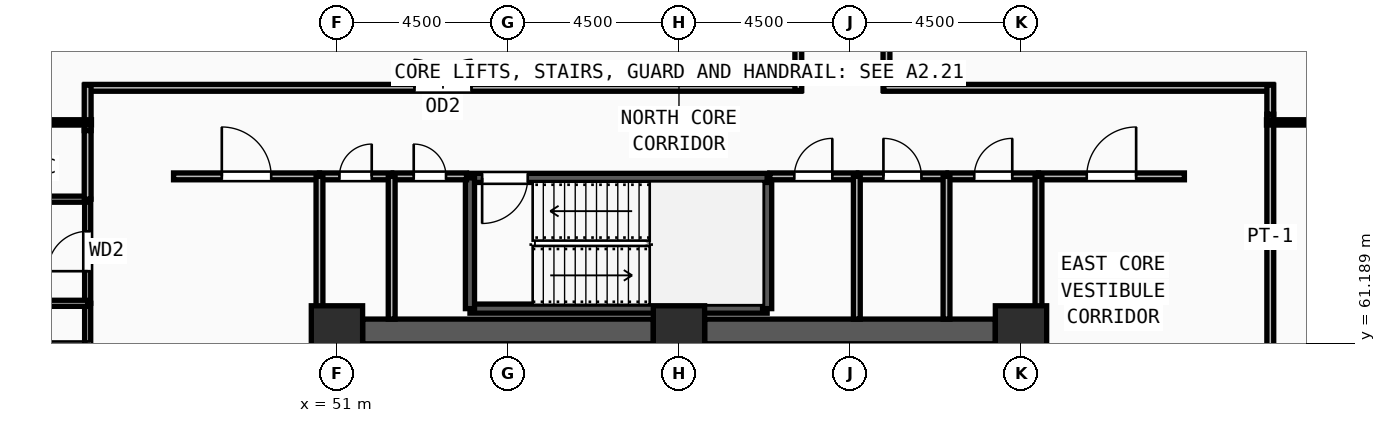
"""IFC4 building model, lengths in metres.
Left out: names, types, materials, properties, quantities, classifications, styles, units other than length and angle.
Written with IfcOpenShell. Run it as: python <this file> out.ifc"""

import sys

from ifc_helpers import new_model, si_unit, direction, frame, frame_2d, origin, origin_2d, place, context, subcontext, project, spatial, rectangle, extrude, source, transform, mapped, element, fill, save


model = new_model("IFC4")
c1 = context("Model", 3, precision=1e-05, world=origin(), true_north=direction((0.0, 1.0)))
c2 = subcontext(c1, "Body", "Model", "MODEL_VIEW")
j1 = project(units=[si_unit("LENGTHUNIT", "METRE"), si_unit("PLANEANGLEUNIT", "RADIAN")], contexts=[c1])
p1 = place(None, origin())
s1 = spatial("IfcSite", under=j1, at=p1, CompositionType="ELEMENT")
p2 = place(p1, origin())
s2 = spatial("IfcBuilding", under=s1, at=p2, CompositionType="ELEMENT")
p3 = place(p2, frame((0.0, 0.0, 213.0)))
s3 = spatial("IfcBuildingStorey", under=s2, at=p3, CompositionType="ELEMENT", Elevation=213.0)
m1 = source(origin(), c2, "Body", "SweptSolid", [
    extrude(rectangle(XDim=1.35, YDim=1.35, at=origin_2d()), origin(), (0.0, 0.0, 1.0), 3.75),
])
for number, where, z_axis, x_axis in (
    (1, (69.0, 61.5, 0.0), (0.0, 0.0, 1.0), (1.0, 0.0, 0.0)),
    (2, (60.0, 61.5, 0.0), (0.0, 0.0, 1.0), (1.0, 0.0, 0.0)),
    (3, (51.0, 61.5, 0.0), (0.0, 0.0, 1.0), (1.0, 0.0, 0.0)),
):
    element("IfcColumn", number, at=place(p3, frame(where, z_axis=z_axis, x_axis=x_axis)), inside=s3, PredefinedType="COLUMN", context=c2, shape_type="MappedRepresentation", body=[
        mapped(m1, transform((0.0, 0.0, 0.0), x_axis=(1.0, 0.0, 0.0), y_axis=(0.0, 1.0, 0.0), z_axis=(0.0, 0.0, 1.0), scale=1.0)),
    ])
for number, where, z_axis, x_axis in (
    (4, (51.675, 61.5, 0.0), (0.0, 0.0, 1.0), (1.0, 0.0, 0.0)),
    (5, (60.675, 61.5, 0.0), (0.0, 0.0, 1.0), (1.0, 0.0, 0.0)),
):
    element("IfcWall", number, at=place(p3, frame(where, z_axis=z_axis, x_axis=x_axis)), inside=s3, PredefinedType="SHEAR", context=c2, shape_type="SweptSolid", body=[
        extrude(rectangle(XDim=7.65, YDim=0.65, at=frame_2d((3.825, 0.0))), origin(), (0.0, 0.0, 1.0), 3.57),
    ])
p4 = place(p3, frame((54.5, 62.1, 0.0), z_axis=(0.0, 0.0, 1.0), x_axis=(1.0, 0.0, 0.0)))
e6 = element("IfcWall", 6, at=p4, inside=s3, PredefinedType="SOLIDWALL", context=c2, shape_type="SweptSolid", body=[
    extrude(rectangle(XDim=7.82, YDim=0.24, at=frame_2d((3.91, 0.0))), origin(), (0.0, 0.0, 1.0), 3.57),
])
p5 = place(p3, frame((62.32, 62.1, 0.0), z_axis=(0.0, 0.0, 1.0), x_axis=(0.0, 1.0, 0.0)))
e7 = element("IfcWall", 7, at=p5, inside=s3, PredefinedType="SOLIDWALL", context=c2, shape_type="SweptSolid", body=[
    extrude(rectangle(XDim=3.44, YDim=0.24, at=frame_2d((1.72, 0.0))), origin(), (0.0, 0.0, 1.0), 3.57),
])
p6 = place(p3, frame((62.32, 65.54, 0.0), z_axis=(0.0, 0.0, 1.0), x_axis=(-1.0, 0.0, 0.0)))
e8 = element("IfcWall", 8, at=p6, inside=s3, PredefinedType="SOLIDWALL", context=c2, shape_type="SweptSolid", body=[
    extrude(rectangle(XDim=7.82, YDim=0.24, at=frame_2d((3.91, 0.0))), origin(), (0.0, 0.0, 1.0), 3.57),
])
m2 = source(origin(), c2, "Body", "SweptSolid", [
    extrude(rectangle(XDim=1.2, YDim=2.2, at=frame_2d((0.6, 1.1))), frame((0.0, 0.13, 0.0), z_axis=(0.0, -1.0, 0.0), x_axis=(1.0, 0.0, 0.0)), (0.0, 0.0, 1.0), 0.26),
])
p7 = place(p6, frame((6.3, 0.0, 0.0)))
e9 = element("IfcOpeningElement", 9, at=p7, cuts=e8, PredefinedType="OPENING", context=c2, shape_type="MappedRepresentation", body=[
    mapped(m2, transform((0.0, 0.0, 0.0), x_axis=(1.0, 0.0, 0.0), y_axis=(0.0, 1.0, 0.0), z_axis=(0.0, 0.0, 1.0), scale=1.0)),
])
p8 = place(p3, frame((54.5, 65.54, 0.0), z_axis=(0.0, 0.0, 1.0), x_axis=(0.0, -1.0, 0.0)))
e10 = element("IfcWall", 10, at=p8, inside=s3, PredefinedType="SOLIDWALL", context=c2, shape_type="SweptSolid", body=[
    extrude(rectangle(XDim=3.44, YDim=0.24, at=frame_2d((1.72, 0.0))), origin(), (0.0, 0.0, 1.0), 3.57),
])
p9 = place(p3, frame((44.44, 59.28, 0.0), z_axis=(0.0, 0.0, 1.0), x_axis=(0.0, 1.0, 0.0)))
e11 = element("IfcWall", 11, at=p9, inside=s3, PredefinedType="PARTITIONING", context=c2, shape_type="SweptSolid", body=[
    extrude(rectangle(XDim=2.96, YDim=0.16, at=frame_2d((1.48, 0.0))), origin(), (0.0, 0.0, 1.0), 3.57),
])
m3 = source(origin(), c2, "Body", "SweptSolid", [
    extrude(rectangle(XDim=0.95, YDim=2.15, at=frame_2d((0.475, 1.075))), frame((0.0, 0.09, 0.0), z_axis=(0.0, -1.0, 0.0), x_axis=(1.0, 0.0, 0.0)), (0.0, 0.0, 1.0), 0.18),
])
p10 = place(p9, frame((1.005, 0.0, 0.0)))
e12 = element("IfcOpeningElement", 12, at=p10, cuts=e11, PredefinedType="OPENING", context=c2, shape_type="MappedRepresentation", body=[
    mapped(m3, transform((0.0, 0.0, 0.0), x_axis=(1.0, 0.0, 0.0), y_axis=(0.0, 1.0, 0.0), z_axis=(0.0, 0.0, 1.0), scale=1.0)),
])
p11 = place(p3, frame((44.44, 62.24, 0.0), z_axis=(0.0, 0.0, 1.0), x_axis=(0.0, 1.0, 0.0)))
e13 = element("IfcWall", 13, at=p11, inside=s3, PredefinedType="PARTITIONING", context=c2, shape_type="SweptSolid", body=[
    extrude(rectangle(XDim=2.74, YDim=0.16, at=frame_2d((1.37, 0.0))), origin(), (0.0, 0.0, 1.0), 3.57),
])
m4 = source(origin(), c2, "Body", "SweptSolid", [
    extrude(rectangle(XDim=1.05, YDim=2.15, at=frame_2d((0.525, 1.075))), frame((0.0, 0.09, 0.0), z_axis=(0.0, -1.0, 0.0), x_axis=(1.0, 0.0, 0.0)), (0.0, 0.0, 1.0), 0.18),
])
p12 = place(p11, frame((0.845, 0.0, 0.0)))
e14 = element("IfcOpeningElement", 14, at=p12, cuts=e13, PredefinedType="OPENING", context=c2, shape_type="MappedRepresentation", body=[
    mapped(m4, transform((0.0, 0.0, 0.0), x_axis=(1.0, 0.0, 0.0), y_axis=(0.0, 1.0, 0.0), z_axis=(0.0, 0.0, 1.0), scale=1.0)),
])
p13 = place(p3, frame((50.54, 65.58, 0.0), z_axis=(0.0, 0.0, 1.0), x_axis=(1.0, 0.0, 0.0)))
e15 = element("IfcWall", 15, at=p13, inside=s3, PredefinedType="PARTITIONING", context=c2, shape_type="SweptSolid", body=[
    extrude(rectangle(XDim=1.9, YDim=0.18, at=frame_2d((0.95, 0.0))), origin(), (0.0, 0.0, 1.0), 3.57),
])
m5 = source(origin(), c2, "Body", "SweptSolid", [
    extrude(rectangle(XDim=0.85, YDim=2.1, at=frame_2d((0.425, 1.05))), frame((0.0, 0.1, 0.0), z_axis=(0.0, -1.0, 0.0), x_axis=(1.0, 0.0, 0.0)), (0.0, 0.0, 1.0), 0.2),
])
p14 = place(p13, frame((0.525, 0.0, 0.0)))
e16 = element("IfcOpeningElement", 16, at=p14, cuts=e15, PredefinedType="OPENING", context=c2, shape_type="MappedRepresentation", body=[
    mapped(m5, transform((0.0, 0.0, 0.0), x_axis=(1.0, 0.0, 0.0), y_axis=(0.0, 1.0, 0.0), z_axis=(0.0, 0.0, 1.0), scale=1.0)),
])
p15 = place(p3, frame((52.48, 65.58, 0.0), z_axis=(0.0, 0.0, 1.0), x_axis=(1.0, 0.0, 0.0)))
e17 = element("IfcWall", 17, at=p15, inside=s3, PredefinedType="PARTITIONING", context=c2, shape_type="SweptSolid", body=[
    extrude(rectangle(XDim=1.93, YDim=0.18, at=frame_2d((0.965, 0.0))), origin(), (0.0, 0.0, 1.0), 3.57),
])
p16 = place(p15, frame((0.54, 0.0, 0.0)))
e18 = element("IfcOpeningElement", 18, at=p16, cuts=e17, PredefinedType="OPENING", context=c2, shape_type="MappedRepresentation", body=[
    mapped(m5, transform((0.0, 0.0, 0.0), x_axis=(1.0, 0.0, 0.0), y_axis=(0.0, 1.0, 0.0), z_axis=(0.0, 0.0, 1.0), scale=1.0)),
])
p17 = place(p3, frame((62.39, 65.58, 0.0), z_axis=(0.0, 0.0, 1.0), x_axis=(1.0, 0.0, 0.0)))
e19 = element("IfcWall", 19, at=p17, inside=s3, PredefinedType="PARTITIONING", context=c2, shape_type="SweptSolid", body=[
    extrude(rectangle(XDim=2.29, YDim=0.18, at=frame_2d((1.145, 0.0))), origin(), (0.0, 0.0, 1.0), 3.57),
])
m6 = source(origin(), c2, "Body", "SweptSolid", [
    extrude(rectangle(XDim=1.0, YDim=2.2, at=frame_2d((0.5, 1.1))), frame((0.0, 0.1, 0.0), z_axis=(0.0, -1.0, 0.0), x_axis=(1.0, 0.0, 0.0)), (0.0, 0.0, 1.0), 0.2),
])
p18 = place(p17, frame((0.645, 0.0, 0.0)))
e20 = element("IfcOpeningElement", 20, at=p18, cuts=e19, PredefinedType="OPENING", context=c2, shape_type="MappedRepresentation", body=[
    mapped(m6, transform((0.0, 0.0, 0.0), x_axis=(1.0, 0.0, 0.0), y_axis=(0.0, 1.0, 0.0), z_axis=(0.0, 0.0, 1.0), scale=1.0)),
])
p19 = place(p3, frame((64.72, 65.58, 0.0), z_axis=(0.0, 0.0, 1.0), x_axis=(1.0, 0.0, 0.0)))
e21 = element("IfcWall", 21, at=p19, inside=s3, PredefinedType="PARTITIONING", context=c2, shape_type="SweptSolid", body=[
    extrude(rectangle(XDim=2.32, YDim=0.18, at=frame_2d((1.16, 0.0))), origin(), (0.0, 0.0, 1.0), 3.57),
])
p20 = place(p19, frame((0.66, 0.0, 0.0)))
e22 = element("IfcOpeningElement", 22, at=p20, cuts=e21, PredefinedType="OPENING", context=c2, shape_type="MappedRepresentation", body=[
    mapped(m6, transform((0.0, 0.0, 0.0), x_axis=(1.0, 0.0, 0.0), y_axis=(0.0, 1.0, 0.0), z_axis=(0.0, 0.0, 1.0), scale=1.0)),
])
p21 = place(p3, frame((67.08, 65.58, 0.0), z_axis=(0.0, 0.0, 1.0), x_axis=(1.0, 0.0, 0.0)))
e23 = element("IfcWall", 23, at=p21, inside=s3, PredefinedType="PARTITIONING", context=c2, shape_type="SweptSolid", body=[
    extrude(rectangle(XDim=2.38, YDim=0.18, at=frame_2d((1.19, 0.0))), origin(), (0.0, 0.0, 1.0), 3.57),
])
p22 = place(p21, frame((0.69, 0.0, 0.0)))
e24 = element("IfcOpeningElement", 24, at=p22, cuts=e23, PredefinedType="OPENING", context=c2, shape_type="MappedRepresentation", body=[
    mapped(m6, transform((0.0, 0.0, 0.0), x_axis=(1.0, 0.0, 0.0), y_axis=(0.0, 1.0, 0.0), z_axis=(0.0, 0.0, 1.0), scale=1.0)),
])
p23 = place(p3, frame((46.7, 65.58, 0.0), z_axis=(0.0, 0.0, 1.0), x_axis=(1.0, 0.0, 0.0)))
e25 = element("IfcWall", 25, at=p23, inside=s3, PredefinedType="PARTITIONING", context=c2, shape_type="SweptSolid", body=[
    extrude(rectangle(XDim=3.84, YDim=0.18, at=frame_2d((1.92, 0.0))), origin(), (0.0, 0.0, 1.0), 3.57),
])
m7 = source(origin(), c2, "Body", "SweptSolid", [
    extrude(rectangle(XDim=1.3, YDim=2.2, at=frame_2d((0.65, 1.1))), frame((0.0, 0.1, 0.0), z_axis=(0.0, -1.0, 0.0), x_axis=(1.0, 0.0, 0.0)), (0.0, 0.0, 1.0), 0.2),
])
p24 = place(p23, frame((1.27, 0.0, 0.0)))
e26 = element("IfcOpeningElement", 26, at=p24, cuts=e25, PredefinedType="OPENING", context=c2, shape_type="MappedRepresentation", body=[
    mapped(m7, transform((0.0, 0.0, 0.0), x_axis=(1.0, 0.0, 0.0), y_axis=(0.0, 1.0, 0.0), z_axis=(0.0, 0.0, 1.0), scale=1.0)),
])
p25 = place(p3, frame((69.46, 65.58, 0.0), z_axis=(0.0, 0.0, 1.0), x_axis=(1.0, 0.0, 0.0)))
e27 = element("IfcWall", 27, at=p25, inside=s3, PredefinedType="PARTITIONING", context=c2, shape_type="SweptSolid", body=[
    extrude(rectangle(XDim=3.84, YDim=0.18, at=frame_2d((1.92, 0.0))), origin(), (0.0, 0.0, 1.0), 3.57),
])
p26 = place(p25, frame((1.27, 0.0, 0.0)))
e28 = element("IfcOpeningElement", 28, at=p26, cuts=e27, PredefinedType="OPENING", context=c2, shape_type="MappedRepresentation", body=[
    mapped(m7, transform((0.0, 0.0, 0.0), x_axis=(1.0, 0.0, 0.0), y_axis=(0.0, 1.0, 0.0), z_axis=(0.0, 0.0, 1.0), scale=1.0)),
])
p27 = place(p3, frame((75.56, 67.215, 0.0), z_axis=(0.0, 0.0, 1.0), x_axis=(0.0, -1.0, 0.0)))
e29 = element("IfcWall", 29, at=p27, inside=s3, PredefinedType="PARTITIONING", context=c2, shape_type="SweptSolid", body=[
    extrude(rectangle(XDim=14.93, YDim=0.18, at=frame_2d((7.465, 0.0))), origin(), (0.0, 0.0, 1.0), 3.57),
])
m8 = source(origin(), c2, "Body", "SweptSolid", [
    extrude(rectangle(XDim=1.5, YDim=2.2, at=frame_2d((0.75, 1.1))), frame((0.0, 0.1, 0.0), z_axis=(0.0, -1.0, 0.0), x_axis=(1.0, 0.0, 0.0)), (0.0, 0.0, 1.0), 0.2),
])
p28 = place(p27, frame((6.715, 0.0, 0.0)))
e30 = element("IfcOpeningElement", 30, at=p28, cuts=e29, PredefinedType="OPENING", context=c2, shape_type="MappedRepresentation", body=[
    mapped(m8, transform((0.0, 0.0, 0.0), x_axis=(1.0, 0.0, 0.0), y_axis=(0.0, 1.0, 0.0), z_axis=(0.0, 0.0, 1.0), scale=1.0)),
])
p29 = place(p3, frame((65.46, 78.666, 0.0), z_axis=(0.0, 0.0, 1.0), x_axis=(0.0, -1.0, 0.0)))
e31 = element("IfcWall", 31, at=p29, inside=s3, PredefinedType="PARTITIONING", context=c2, shape_type="SweptSolid", body=[
    extrude(rectangle(XDim=10.826, YDim=0.18, at=frame_2d((5.413, 0.0))), origin(), (0.0, 0.0, 1.0), 3.57),
])
p30 = place(p29, frame((4.663, 0.0, 0.0)))
e32 = element("IfcOpeningElement", 32, at=p30, cuts=e31, PredefinedType="OPENING", context=c2, shape_type="MappedRepresentation", body=[
    mapped(m8, transform((0.0, 0.0, 0.0), x_axis=(1.0, 0.0, 0.0), y_axis=(0.0, 1.0, 0.0), z_axis=(0.0, 0.0, 1.0), scale=1.0)),
])
p31 = place(p3, frame((44.37, 67.91, 0.0), z_axis=(0.0, 0.0, 1.0), x_axis=(1.0, 0.0, 0.0)))
e33 = element("IfcWall", 33, at=p31, inside=s3, PredefinedType="PARTITIONING", context=c2, shape_type="SweptSolid", body=[
    extrude(rectangle(XDim=18.84, YDim=0.18, at=frame_2d((9.42, 0.0))), origin(), (0.0, 0.0, 1.0), 3.57),
])
p32 = place(p31, frame((8.67, 0.0, 0.0)))
e34 = element("IfcOpeningElement", 34, at=p32, cuts=e33, PredefinedType="OPENING", context=c2, shape_type="MappedRepresentation", body=[
    mapped(m8, transform((0.0, 0.0, 0.0), x_axis=(1.0, 0.0, 0.0), y_axis=(0.0, 1.0, 0.0), z_axis=(0.0, 0.0, 1.0), scale=1.0)),
])
for number, where, z_axis, x_axis in (
    (35, (39.98, 62.24, 0.0), (0.0, 0.0, 1.0), (1.0, 0.0, 0.0)),
    (36, (39.98, 64.98, 0.0), (0.0, 0.0, 1.0), (1.0, 0.0, 0.0)),
):
    element("IfcWall", number, at=place(p3, frame(where, z_axis=z_axis, x_axis=x_axis)), inside=s3, PredefinedType="PARTITIONING", context=c2, shape_type="SweptSolid", body=[
        extrude(rectangle(XDim=4.46, YDim=0.16, at=frame_2d((2.23, 0.0))), origin(), (0.0, 0.0, 1.0), 3.57),
    ])
p33 = place(p3, frame((50.54, 61.95, 0.0), z_axis=(0.0, 0.0, 1.0), x_axis=(0.0, 1.0, 0.0)))
e37 = element("IfcWall", 37, at=p33, inside=s3, PredefinedType="PARTITIONING", context=c2, shape_type="SweptSolid", body=[
    extrude(rectangle(XDim=3.63, YDim=0.18, at=frame_2d((1.815, 0.0))), origin(), (0.0, 0.0, 1.0), 3.57),
])
for number, where, z_axis, x_axis in (
    (38, (52.44, 61.825, 0.0), (0.0, 0.0, 1.0), (0.0, 1.0, 0.0)),
    (39, (64.68, 61.825, 0.0), (0.0, 0.0, 1.0), (0.0, 1.0, 0.0)),
    (40, (67.04, 61.825, 0.0), (0.0, 0.0, 1.0), (0.0, 1.0, 0.0)),
):
    element("IfcWall", number, at=place(p3, frame(where, z_axis=z_axis, x_axis=x_axis)), inside=s3, PredefinedType="PARTITIONING", context=c2, shape_type="SweptSolid", body=[
        extrude(rectangle(XDim=3.755, YDim=0.18, at=frame_2d((1.877, 0.0))), origin(), (0.0, 0.0, 1.0), 3.57),
    ])
p34 = place(p3, frame((69.46, 61.95, 0.0), z_axis=(0.0, 0.0, 1.0), x_axis=(0.0, 1.0, 0.0)))
e41 = element("IfcWall", 41, at=p34, inside=s3, PredefinedType="PARTITIONING", context=c2, shape_type="SweptSolid", body=[
    extrude(rectangle(XDim=3.63, YDim=0.18, at=frame_2d((1.815, 0.0))), origin(), (0.0, 0.0, 1.0), 3.57),
])
p35 = place(p3, frame((65.39, 67.91, 0.0), z_axis=(0.0, 0.0, 1.0), x_axis=(1.0, 0.0, 0.0)))
e42 = element("IfcWall", 42, at=p35, inside=s3, PredefinedType="PARTITIONING", context=c2, shape_type="SweptSolid", body=[
    extrude(rectangle(XDim=10.24, YDim=0.18, at=frame_2d((5.12, 0.0))), origin(), (0.0, 0.0, 1.0), 3.57),
])
p36 = place(p3, frame((75.56, 67.98, 0.0), z_axis=(0.0, 0.0, 1.0), x_axis=(0.0, -1.0, 0.0)))
e43 = element("IfcWall", 43, at=p36, inside=s3, PredefinedType="PARTITIONING", context=c2, shape_type="SweptSolid", body=[
    extrude(rectangle(XDim=0.765, YDim=0.18, at=frame_2d((0.382, 0.0))), origin(), (0.0, 0.0, 1.0), 3.57),
])
p37 = place(p3, frame((63.14, 67.84, 0.0), z_axis=(0.0, 0.0, 1.0), x_axis=(0.0, 1.0, 0.0)))
e44 = element("IfcWall", 44, at=p37, inside=s3, PredefinedType="PARTITIONING", context=c2, shape_type="SweptSolid", body=[
    extrude(rectangle(XDim=10.999, YDim=0.18, at=frame_2d((5.5, 0.0))), origin(), (0.0, 0.0, 1.0), 3.57),
])
p38 = place(p3, frame((44.44, 66.785, 0.0), z_axis=(0.0, 0.0, 1.0), x_axis=(0.0, 1.0, 0.0)))
e45 = element("IfcWall", 45, at=p38, inside=s3, PredefinedType="PARTITIONING", context=c2, shape_type="SweptSolid", body=[
    extrude(rectangle(XDim=1.195, YDim=0.18, at=frame_2d((0.598, 0.0))), origin(), (0.0, 0.0, 1.0), 3.57),
])
p39 = place(p3, frame((44.44, 64.98, 0.0), z_axis=(0.0, 0.0, 1.0), x_axis=(0.0, 1.0, 0.0)))
e46 = element("IfcWall", 46, at=p39, inside=s3, PredefinedType="PARTITIONING", context=c2, shape_type="SweptSolid", body=[
    extrude(rectangle(XDim=1.805, YDim=0.18, at=frame_2d((0.902, 0.0))), origin(), (0.0, 0.0, 1.0), 3.57),
])
p40 = place(p3, frame((44.54, 67.0, 0.0), z_axis=(0.0, 0.0, 1.0), x_axis=(-1.0, 0.0, 0.0)))
e47 = element("IfcWall", 47, at=p40, inside=s3, PredefinedType="PARTITIONING", context=c2, shape_type="SweptSolid", body=[
    extrude(rectangle(XDim=18.668, YDim=0.14, at=frame_2d((9.334, 0.0))), origin(), (0.0, 0.0, 1.0), 2.855),
])
p41 = place(p3, frame((75.46, 67.0, 0.0), z_axis=(0.0, 0.0, 1.0), x_axis=(1.0, 0.0, 0.0)))
e48 = element("IfcWall", 48, at=p41, inside=s3, PredefinedType="PARTITIONING", context=c2, shape_type="SweptSolid", body=[
    extrude(rectangle(XDim=18.665, YDim=0.14, at=frame_2d((9.333, 0.0))), origin(), (0.0, 0.0, 1.0), 2.855),
])
m9 = source(origin(), c2, "Body", "SweptSolid", [
    extrude(rectangle(XDim=1.2, YDim=2.2, at=frame_2d((0.6, 1.1))), frame((0.0, 0.025, 0.0), z_axis=(0.0, -1.0, 0.0), x_axis=(1.0, 0.0, 0.0)), (0.0, 0.0, 1.0), 0.05),
])
p42 = place(p7, origin())
e49 = element("IfcDoor", 49, at=p42, inside=s3, OperationType="SINGLE_SWING_RIGHT", PredefinedType="DOOR", context=c2, shape_type="MappedRepresentation", body=[
    mapped(m9, transform((0.0, 0.0, 0.0), x_axis=(1.0, 0.0, 0.0), y_axis=(0.0, 1.0, 0.0), z_axis=(0.0, 0.0, 1.0), scale=1.0)),
])
fill(e9, e49)
m10 = source(origin(), c2, "Body", "SweptSolid", [
    extrude(rectangle(XDim=0.95, YDim=2.15, at=frame_2d((0.475, 1.075))), frame((0.0, 0.025, 0.0), z_axis=(0.0, -1.0, 0.0), x_axis=(1.0, 0.0, 0.0)), (0.0, 0.0, 1.0), 0.05),
])
p43 = place(p10, origin())
e50 = element("IfcDoor", 50, at=p43, inside=s3, OperationType="SINGLE_SWING_RIGHT", PredefinedType="DOOR", context=c2, shape_type="MappedRepresentation", body=[
    mapped(m10, transform((0.0, 0.0, 0.0), x_axis=(1.0, 0.0, 0.0), y_axis=(0.0, 1.0, 0.0), z_axis=(0.0, 0.0, 1.0), scale=1.0)),
])
fill(e12, e50)
m11 = source(origin(), c2, "Body", "SweptSolid", [
    extrude(rectangle(XDim=1.05, YDim=2.15, at=frame_2d((0.525, 1.075))), frame((0.0, 0.025, 0.0), z_axis=(0.0, -1.0, 0.0), x_axis=(1.0, 0.0, 0.0)), (0.0, 0.0, 1.0), 0.05),
])
p44 = place(p12, origin())
e51 = element("IfcDoor", 51, at=p44, inside=s3, OperationType="SINGLE_SWING_LEFT", PredefinedType="DOOR", context=c2, shape_type="MappedRepresentation", body=[
    mapped(m11, transform((0.0, 0.0, 0.0), x_axis=(1.0, 0.0, 0.0), y_axis=(0.0, 1.0, 0.0), z_axis=(0.0, 0.0, 1.0), scale=1.0)),
])
fill(e14, e51)
m12 = source(origin(), c2, "Body", "SweptSolid", [
    extrude(rectangle(XDim=0.85, YDim=2.1, at=frame_2d((0.425, 1.05))), frame((0.0, 0.025, 0.0), z_axis=(0.0, -1.0, 0.0), x_axis=(1.0, 0.0, 0.0)), (0.0, 0.0, 1.0), 0.05),
])
p45 = place(p14, origin())
e52 = element("IfcDoor", 52, at=p45, inside=s3, OperationType="SINGLE_SWING_RIGHT", PredefinedType="DOOR", context=c2, shape_type="MappedRepresentation", body=[
    mapped(m12, transform((0.0, 0.0, 0.0), x_axis=(1.0, 0.0, 0.0), y_axis=(0.0, 1.0, 0.0), z_axis=(0.0, 0.0, 1.0), scale=1.0)),
])
fill(e16, e52)
p46 = place(p16, origin())
e53 = element("IfcDoor", 53, at=p46, inside=s3, OperationType="SINGLE_SWING_LEFT", PredefinedType="DOOR", context=c2, shape_type="MappedRepresentation", body=[
    mapped(m12, transform((0.0, 0.0, 0.0), x_axis=(1.0, 0.0, 0.0), y_axis=(0.0, 1.0, 0.0), z_axis=(0.0, 0.0, 1.0), scale=1.0)),
])
fill(e18, e53)
m13 = source(origin(), c2, "Body", "SweptSolid", [
    extrude(rectangle(XDim=1.0, YDim=2.2, at=frame_2d((0.5, 1.1))), frame((0.0, 0.025, 0.0), z_axis=(0.0, -1.0, 0.0), x_axis=(1.0, 0.0, 0.0)), (0.0, 0.0, 1.0), 0.05),
])
p47 = place(p18, origin())
e54 = element("IfcDoor", 54, at=p47, inside=s3, OperationType="SINGLE_SWING_RIGHT", PredefinedType="DOOR", context=c2, shape_type="MappedRepresentation", body=[
    mapped(m13, transform((0.0, 0.0, 0.0), x_axis=(1.0, 0.0, 0.0), y_axis=(0.0, 1.0, 0.0), z_axis=(0.0, 0.0, 1.0), scale=1.0)),
])
fill(e20, e54)
p48 = place(p20, origin())
e55 = element("IfcDoor", 55, at=p48, inside=s3, OperationType="SINGLE_SWING_LEFT", PredefinedType="DOOR", context=c2, shape_type="MappedRepresentation", body=[
    mapped(m13, transform((0.0, 0.0, 0.0), x_axis=(1.0, 0.0, 0.0), y_axis=(0.0, 1.0, 0.0), z_axis=(0.0, 0.0, 1.0), scale=1.0)),
])
fill(e22, e55)
p49 = place(p22, origin())
e56 = element("IfcDoor", 56, at=p49, inside=s3, OperationType="SINGLE_SWING_RIGHT", PredefinedType="DOOR", context=c2, shape_type="MappedRepresentation", body=[
    mapped(m13, transform((0.0, 0.0, 0.0), x_axis=(1.0, 0.0, 0.0), y_axis=(0.0, 1.0, 0.0), z_axis=(0.0, 0.0, 1.0), scale=1.0)),
])
fill(e24, e56)
m14 = source(origin(), c2, "Body", "SweptSolid", [
    extrude(rectangle(XDim=1.3, YDim=2.2, at=frame_2d((0.65, 1.1))), frame((0.0, 0.025, 0.0), z_axis=(0.0, -1.0, 0.0), x_axis=(1.0, 0.0, 0.0)), (0.0, 0.0, 1.0), 0.05),
])
p50 = place(p24, origin())
e57 = element("IfcDoor", 57, at=p50, inside=s3, OperationType="SINGLE_SWING_LEFT", PredefinedType="DOOR", context=c2, shape_type="MappedRepresentation", body=[
    mapped(m14, transform((0.0, 0.0, 0.0), x_axis=(1.0, 0.0, 0.0), y_axis=(0.0, 1.0, 0.0), z_axis=(0.0, 0.0, 1.0), scale=1.0)),
])
fill(e26, e57)
p51 = place(p26, origin())
e58 = element("IfcDoor", 58, at=p51, inside=s3, OperationType="SINGLE_SWING_RIGHT", PredefinedType="DOOR", context=c2, shape_type="MappedRepresentation", body=[
    mapped(m14, transform((0.0, 0.0, 0.0), x_axis=(1.0, 0.0, 0.0), y_axis=(0.0, 1.0, 0.0), z_axis=(0.0, 0.0, 1.0), scale=1.0)),
])
fill(e28, e58)
m15 = source(origin(), c2, "Body", "SweptSolid", [
    extrude(rectangle(XDim=1.5, YDim=2.2, at=frame_2d((0.75, 1.1))), frame((0.0, 0.025, 0.0), z_axis=(0.0, -1.0, 0.0), x_axis=(1.0, 0.0, 0.0)), (0.0, 0.0, 1.0), 0.05),
])
p52 = place(p32, origin())
e59 = element("IfcDoor", 59, at=p52, inside=s3, OperationType="DOUBLE_DOOR_SINGLE_SWING", PredefinedType="DOOR", context=c2, shape_type="MappedRepresentation", body=[
    mapped(m15, transform((0.0, 0.0, 0.0), x_axis=(1.0, 0.0, 0.0), y_axis=(0.0, 1.0, 0.0), z_axis=(0.0, 0.0, 1.0), scale=1.0)),
])
fill(e34, e59)
save(model, sys.argv[1])
